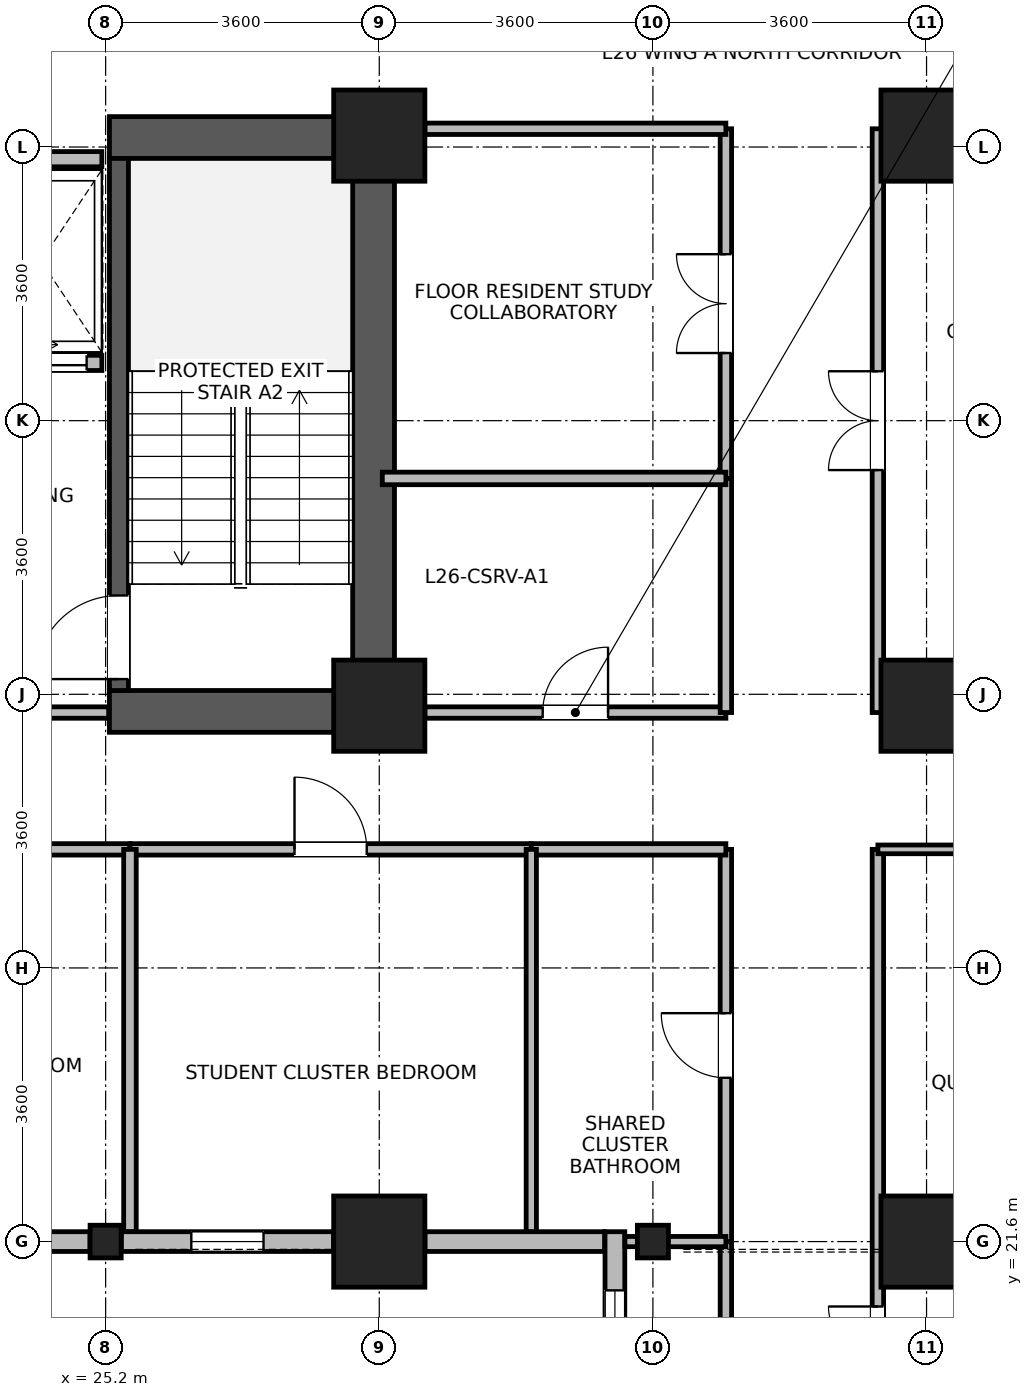
"""IFC4 building model, lengths in metres.
Left out: names, types, materials, properties, quantities, classifications, styles, units other than length and angle.
Written with IfcOpenShell. Run it as: python <this file> out.ifc"""

import sys

from ifc_helpers import new_model, si_unit, direction, frame, frame_2d, origin, origin_2d, place, context, subcontext, project, spatial, rectangle, i_section, extrude, source, transform, mapped, element, fill, save


model = new_model("IFC4")
c1 = context("Model", 3, precision=1e-05, world=origin(), true_north=direction((0.0, 1.0)))
c2 = subcontext(c1, "Body", "Model", "MODEL_VIEW")
j1 = project(units=[si_unit("LENGTHUNIT", "METRE"), si_unit("PLANEANGLEUNIT", "RADIAN")], contexts=[c1])
p1 = place(None, origin())
s1 = spatial("IfcSite", under=j1, at=p1, CompositionType="ELEMENT")
p2 = place(p1, origin())
s2 = spatial("IfcBuilding", under=s1, at=p2, CompositionType="ELEMENT")
p3 = place(p2, frame((0.0, 0.0, 104.5)))
s3 = spatial("IfcBuildingStorey", under=s2, at=p3, CompositionType="ELEMENT", Elevation=104.5)
p4 = place(p3, frame((28.725, 28.3, 0.0), z_axis=(0.0, 0.0, 1.0), x_axis=(0.0, 1.0, 0.0)))
e1 = element("IfcWall", 1, at=p4, inside=s3, PredefinedType="SHEAR", context=c2, shape_type="SweptSolid", body=[
    extrude(rectangle(XDim=8.1, YDim=0.55, at=frame_2d((4.05, 0.0))), origin(), (0.0, 0.0, 1.0), 3.45),
])
for number, where, z_axis, x_axis in (
    (2, (25.25, 28.575, 0.0), (0.0, 0.0, 1.0), (1.0, 0.0, 0.0)),
    (3, (25.25, 36.125, 0.0), (0.0, 0.0, 1.0), (1.0, 0.0, 0.0)),
):
    element("IfcWall", number, at=place(p3, frame(where, z_axis=z_axis, x_axis=x_axis)), inside=s3, PredefinedType="SHEAR", context=c2, shape_type="SweptSolid", body=[
        extrude(rectangle(XDim=3.2, YDim=0.55, at=frame_2d((1.6, 0.0))), origin(), (0.0, 0.0, 1.0), 3.45),
    ])
p5 = place(p3, frame((25.375, 28.85, 0.0), z_axis=(0.0, 0.0, 1.0), x_axis=(0.0, 1.0, 0.0)))
e4 = element("IfcWall", 4, at=p5, inside=s3, PredefinedType="SHEAR", context=c2, shape_type="SweptSolid", body=[
    extrude(rectangle(XDim=7.0, YDim=0.25, at=frame_2d((3.5, 0.0))), origin(), (0.0, 0.0, 1.0), 3.45),
])
p6 = place(p5, frame((0.15, 0.0, 0.0)))
e5 = element("IfcOpeningElement", 5, at=p6, cuts=e4, PredefinedType="OPENING", context=c2, shape_type="SweptSolid", body=[
    extrude(rectangle(XDim=1.1, YDim=2.08, at=frame_2d((0.55, 1.04))), frame((0.0, 0.135, 0.0), z_axis=(0.0, -1.0, 0.0), x_axis=(1.0, 0.0, 0.0)), (0.0, 0.0, 1.0), 0.27),
])
m1 = source(origin(), c2, "Body", "SweptSolid", [
    extrude(rectangle(XDim=1.2, YDim=1.2, at=origin_2d()), origin(), (0.0, 0.0, 1.0), 3.7),
])
for number, where, z_axis, x_axis in (
    (6, (28.8, 21.6, 0.0), (0.0, 0.0, 1.0), (1.0, 0.0, 0.0)),
    (7, (28.8, 28.65, 0.0), (0.0, 0.0, 1.0), (1.0, 0.0, 0.0)),
    (8, (28.8, 36.15, 0.0), (0.0, 0.0, 1.0), (1.0, 0.0, 0.0)),
    (9, (36.0, 21.6, 0.0), (0.0, 0.0, 1.0), (1.0, 0.0, 0.0)),
    (10, (36.0, 28.65, 0.0), (0.0, 0.0, 1.0), (1.0, 0.0, 0.0)),
    (11, (36.0, 36.15, 0.0), (0.0, 0.0, 1.0), (1.0, 0.0, 0.0)),
):
    element("IfcColumn", number, at=place(p3, frame(where, z_axis=z_axis, x_axis=x_axis)), inside=s3, PredefinedType="COLUMN", context=c2, shape_type="MappedRepresentation", body=[
        mapped(m1, transform((0.0, 0.0, 0.0), x_axis=(1.0, 0.0, 0.0), y_axis=(0.0, 1.0, 0.0), z_axis=(0.0, 0.0, 1.0), scale=1.0)),
    ])
m2 = source(origin(), c2, "Body", "SweptSolid", [
    extrude(i_section(OverallWidth=0.409, OverallDepth=0.43, WebThickness=0.024, FlangeThickness=0.033, FilletRadius=0.015, at=origin_2d()), origin(), (0.0, 0.0, 1.0), 3.7),
])
for number, where, z_axis, x_axis in (
    (12, (25.2, 21.6, 0.0), (0.0, 0.0, 1.0), (1.0, 0.0, 0.0)),
    (13, (32.4, 21.6, 0.0), (0.0, 0.0, 1.0), (1.0, 0.0, 0.0)),
):
    element("IfcColumn", number, at=place(p3, frame(where, z_axis=z_axis, x_axis=x_axis)), inside=s3, PredefinedType="COLUMN", context=c2, shape_type="MappedRepresentation", body=[
        mapped(m2, transform((0.0, 0.0, 0.0), x_axis=(1.0, 0.0, 0.0), y_axis=(0.0, 1.0, 0.0), z_axis=(0.0, 0.0, 1.0), scale=1.0)),
    ])
p7 = place(p3, frame((24.994, 21.6, 0.0), z_axis=(0.0, 0.0, 1.0), x_axis=(-1.0, 0.0, 0.0)))
e14 = element("IfcWall", 14, at=p7, inside=s3, PredefinedType="STANDARD", context=c2, shape_type="SweptSolid", body=[
    extrude(rectangle(XDim=2.793, YDim=0.26, at=frame_2d((1.397, 0.0))), origin(), (0.0, 0.0, 1.0), 2.98),
])
p8 = place(p7, frame((0.922, 0.0, 0.85)))
e15 = element("IfcOpeningElement", 15, at=p8, cuts=e14, PredefinedType="OPENING", context=c2, shape_type="SweptSolid", body=[
    extrude(rectangle(XDim=0.95, YDim=1.75, at=frame_2d((0.475, 0.875))), frame((0.0, 0.14, 0.0), z_axis=(0.0, -1.0, 0.0), x_axis=(1.0, 0.0, 0.0)), (0.0, 0.0, 1.0), 0.28),
])
p9 = place(p3, frame((28.199, 21.6, 0.0), z_axis=(0.0, 0.0, 1.0), x_axis=(-1.0, 0.0, 0.0)))
e16 = element("IfcWall", 16, at=p9, inside=s3, PredefinedType="STANDARD", context=c2, shape_type="SweptSolid", body=[
    extrude(rectangle(XDim=2.793, YDim=0.26, at=frame_2d((1.397, 0.0))), origin(), (0.0, 0.0, 1.0), 2.98),
])
p10 = place(p9, frame((0.922, 0.0, 0.85)))
e17 = element("IfcOpeningElement", 17, at=p10, cuts=e16, PredefinedType="OPENING", context=c2, shape_type="SweptSolid", body=[
    extrude(rectangle(XDim=0.95, YDim=1.75, at=frame_2d((0.475, 0.875))), frame((0.0, 0.14, 0.0), z_axis=(0.0, -1.0, 0.0), x_axis=(1.0, 0.0, 0.0)), (0.0, 0.0, 1.0), 0.28),
])
p11 = place(p3, frame((31.765, 21.6, 0.0), z_axis=(0.0, 0.0, 1.0), x_axis=(-1.0, 0.0, 0.0)))
e18 = element("IfcWall", 18, at=p11, inside=s3, PredefinedType="STANDARD", context=c2, shape_type="SweptSolid", body=[
    extrude(rectangle(XDim=2.364, YDim=0.26, at=frame_2d((1.182, 0.0))), origin(), (0.0, 0.0, 1.0), 2.98),
])
p12 = place(p3, frame((31.9, 1.67, 0.0), z_axis=(0.0, 0.0, 1.0), x_axis=(0.0, 1.0, 0.0)))
e19 = element("IfcWall", 19, at=p12, inside=s3, PredefinedType="STANDARD", context=c2, shape_type="SweptSolid", body=[
    extrude(rectangle(XDim=20.06, YDim=0.26, at=frame_2d((10.03, 0.0))), origin(), (0.0, 0.0, 1.0), 3.43),
])
p13 = place(p12, frame((0.772, 0.0, 0.85)))
e20 = element("IfcOpeningElement", 20, at=p13, cuts=e19, PredefinedType="OPENING", context=c2, shape_type="SweptSolid", body=[
    extrude(rectangle(XDim=1.8, YDim=1.85, at=frame_2d((0.9, 0.925))), frame((0.0, 0.14, 0.0), z_axis=(0.0, -1.0, 0.0), x_axis=(1.0, 0.0, 0.0)), (0.0, 0.0, 1.0), 0.28),
])
p14 = place(p12, frame((7.458, 0.0, 0.85)))
e21 = element("IfcOpeningElement", 21, at=p14, cuts=e19, PredefinedType="OPENING", context=c2, shape_type="SweptSolid", body=[
    extrude(rectangle(XDim=1.8, YDim=1.85, at=frame_2d((0.9, 0.925))), frame((0.0, 0.14, 0.0), z_axis=(0.0, -1.0, 0.0), x_axis=(1.0, 0.0, 0.0)), (0.0, 0.0, 1.0), 0.28),
])
p15 = place(p12, frame((14.145, 0.0, 0.85)))
e22 = element("IfcOpeningElement", 22, at=p15, cuts=e19, PredefinedType="OPENING", context=c2, shape_type="SweptSolid", body=[
    extrude(rectangle(XDim=1.8, YDim=1.85, at=frame_2d((0.9, 0.925))), frame((0.0, 0.14, 0.0), z_axis=(0.0, -1.0, 0.0), x_axis=(1.0, 0.0, 0.0)), (0.0, 0.0, 1.0), 0.28),
])
p16 = place(p12, frame((17.488, 0.0, 0.85)))
e23 = element("IfcOpeningElement", 23, at=p16, cuts=e19, PredefinedType="OPENING", context=c2, shape_type="SweptSolid", body=[
    extrude(rectangle(XDim=1.8, YDim=1.85, at=frame_2d((0.9, 0.925))), frame((0.0, 0.14, 0.0), z_axis=(0.0, -1.0, 0.0), x_axis=(1.0, 0.0, 0.0)), (0.0, 0.0, 1.0), 0.28),
])
p17 = place(p3, frame((23.55, 33.16, 0.0), z_axis=(0.0, 0.0, 1.0), x_axis=(1.0, 0.0, 0.0)))
e24 = element("IfcWall", 24, at=p17, inside=s3, PredefinedType="PARTITIONING", context=c2, shape_type="SweptSolid", body=[
    extrude(rectangle(XDim=1.6, YDim=0.2, at=frame_2d((0.8, 0.0))), origin(), (0.0, 0.0, 1.0), 3.43),
])
p18 = place(p17, frame((0.2, 0.0, 0.0)))
e25 = element("IfcOpeningElement", 25, at=p18, cuts=e24, PredefinedType="OPENING", context=c2, shape_type="SweptSolid", body=[
    extrude(rectangle(XDim=1.2, YDim=2.12, at=frame_2d((0.6, 1.06))), frame((0.0, 0.11, 0.0), z_axis=(0.0, -1.0, 0.0), x_axis=(1.0, 0.0, 0.0)), (0.0, 0.0, 1.0), 0.22),
])
p19 = place(p3, frame((23.55, 35.84, 0.0), z_axis=(0.0, 0.0, 1.0), x_axis=(1.0, 0.0, 0.0)))
e26 = element("IfcWall", 26, at=p19, inside=s3, PredefinedType="PARTITIONING", context=c2, shape_type="SweptSolid", body=[
    extrude(rectangle(XDim=1.6, YDim=0.2, at=frame_2d((0.8, 0.0))), origin(), (0.0, 0.0, 1.0), 2.43),
])
p20 = place(p3, frame((35.36, 16.96, 0.0), z_axis=(0.0, 0.0, 1.0), x_axis=(0.0, 1.0, 0.0)))
e27 = element("IfcWall", 27, at=p20, inside=s3, PredefinedType="PARTITIONING", context=c2, shape_type="SweptSolid", body=[
    extrude(rectangle(XDim=9.8, YDim=0.15, at=frame_2d((4.9, 0.0))), origin(), (0.0, 0.0, 1.0), 3.43),
])
p21 = place(p20, frame((2.486, 0.0, 0.0)))
e28 = element("IfcOpeningElement", 28, at=p21, cuts=e27, PredefinedType="OPENING", context=c2, shape_type="SweptSolid", body=[
    extrude(rectangle(XDim=1.3, YDim=2.12, at=frame_2d((0.65, 1.06))), frame((0.0, 0.085, 0.0), z_axis=(0.0, -1.0, 0.0), x_axis=(1.0, 0.0, 0.0)), (0.0, 0.0, 1.0), 0.17),
])
p22 = place(p3, frame((35.36, 28.56, 0.0), z_axis=(0.0, 0.0, 1.0), x_axis=(0.0, 1.0, 0.0)))
e29 = element("IfcWall", 29, at=p22, inside=s3, PredefinedType="PARTITIONING", context=c2, shape_type="SweptSolid", body=[
    extrude(rectangle(XDim=7.68, YDim=0.15, at=frame_2d((3.84, 0.0))), origin(), (0.0, 0.0, 1.0), 3.43),
])
p23 = place(p22, frame((3.19, 0.0, 0.0)))
e30 = element("IfcOpeningElement", 30, at=p23, cuts=e29, PredefinedType="OPENING", context=c2, shape_type="SweptSolid", body=[
    extrude(rectangle(XDim=1.3, YDim=2.12, at=frame_2d((0.65, 1.06))), frame((0.0, 0.085, 0.0), z_axis=(0.0, -1.0, 0.0), x_axis=(1.0, 0.0, 0.0)), (0.0, 0.0, 1.0), 0.17),
])
p24 = place(p3, frame((33.36, 14.5, 0.0), z_axis=(0.0, 0.0, 1.0), x_axis=(0.0, 1.0, 0.0)))
e31 = element("IfcWall", 31, at=p24, inside=s3, PredefinedType="PARTITIONING", context=c2, shape_type="SweptSolid", body=[
    extrude(rectangle(XDim=7.1, YDim=0.15, at=frame_2d((3.55, 0.0))), origin(), (0.0, 0.0, 1.0), 3.43),
])
p25 = place(p24, frame((2.9, 0.0, 0.0)))
e32 = element("IfcOpeningElement", 32, at=p25, cuts=e31, PredefinedType="OPENING", context=c2, shape_type="SweptSolid", body=[
    extrude(rectangle(XDim=1.3, YDim=2.12, at=frame_2d((0.65, 1.06))), frame((0.0, 0.085, 0.0), z_axis=(0.0, -1.0, 0.0), x_axis=(1.0, 0.0, 0.0)), (0.0, 0.0, 1.0), 0.17),
])
p26 = place(p3, frame((19.8, 26.76, 0.0), z_axis=(0.0, 0.0, 1.0), x_axis=(1.0, 0.0, 0.0)))
e33 = element("IfcWall", 33, at=p26, inside=s3, PredefinedType="PARTITIONING", context=c2, shape_type="SweptSolid", body=[
    extrude(rectangle(XDim=5.72, YDim=0.15, at=frame_2d((2.86, 0.0))), origin(), (0.0, 0.0, 1.0), 3.43),
])
p27 = place(p26, frame((2.21, 0.0, 0.0)))
e34 = element("IfcOpeningElement", 34, at=p27, cuts=e33, PredefinedType="OPENING", context=c2, shape_type="SweptSolid", body=[
    extrude(rectangle(XDim=1.3, YDim=2.12, at=frame_2d((0.65, 1.06))), frame((0.0, 0.085, 0.0), z_axis=(0.0, -1.0, 0.0), x_axis=(1.0, 0.0, 0.0)), (0.0, 0.0, 1.0), 0.17),
])
p28 = place(p3, frame((25.52, 26.76, 0.0), z_axis=(0.0, 0.0, 1.0), x_axis=(1.0, 0.0, 0.0)))
e35 = element("IfcWall", 35, at=p28, inside=s3, PredefinedType="PARTITIONING", context=c2, shape_type="SweptSolid", body=[
    extrude(rectangle(XDim=5.28, YDim=0.15, at=frame_2d((2.64, 0.0))), origin(), (0.0, 0.0, 1.0), 3.43),
])
p29 = place(p28, frame((2.165, 0.0, 0.0)))
e36 = element("IfcOpeningElement", 36, at=p29, cuts=e35, PredefinedType="OPENING", context=c2, shape_type="SweptSolid", body=[
    extrude(rectangle(XDim=0.95, YDim=2.1, at=frame_2d((0.475, 1.05))), frame((0.0, 0.085, 0.0), z_axis=(0.0, -1.0, 0.0), x_axis=(1.0, 0.0, 0.0)), (0.0, 0.0, 1.0), 0.17),
])
p30 = place(p3, frame((33.36, 21.6, 0.0), z_axis=(0.0, 0.0, 1.0), x_axis=(0.0, 1.0, 0.0)))
e37 = element("IfcWall", 37, at=p30, inside=s3, PredefinedType="PARTITIONING", context=c2, shape_type="SweptSolid", body=[
    extrude(rectangle(XDim=5.16, YDim=0.15, at=frame_2d((2.58, 0.0))), origin(), (0.0, 0.0, 1.0), 3.43),
])
p31 = place(p30, frame((2.155, 0.0, 0.0)))
e38 = element("IfcOpeningElement", 38, at=p31, cuts=e37, PredefinedType="OPENING", context=c2, shape_type="SweptSolid", body=[
    extrude(rectangle(XDim=0.85, YDim=2.04, at=frame_2d((0.425, 1.02))), frame((0.0, 0.085, 0.0), z_axis=(0.0, -1.0, 0.0), x_axis=(1.0, 0.0, 0.0)), (0.0, 0.0, 1.0), 0.17),
])
p32 = place(p3, frame((33.36, 31.64, 0.0), z_axis=(0.0, 0.0, 1.0), x_axis=(0.0, 1.0, 0.0)))
e39 = element("IfcWall", 39, at=p32, inside=s3, PredefinedType="PARTITIONING", context=c2, shape_type="SweptSolid", body=[
    extrude(rectangle(XDim=4.6, YDim=0.15, at=frame_2d((2.3, 0.0))), origin(), (0.0, 0.0, 1.0), 3.43),
])
p33 = place(p32, frame((1.65, 0.0, 0.0)))
e40 = element("IfcOpeningElement", 40, at=p33, cuts=e39, PredefinedType="OPENING", context=c2, shape_type="SweptSolid", body=[
    extrude(rectangle(XDim=1.3, YDim=2.12, at=frame_2d((0.65, 1.06))), frame((0.0, 0.085, 0.0), z_axis=(0.0, -1.0, 0.0), x_axis=(1.0, 0.0, 0.0)), (0.0, 0.0, 1.0), 0.17),
])
p34 = place(p3, frame((29.4, 28.56, 0.0), z_axis=(0.0, 0.0, 1.0), x_axis=(1.0, 0.0, 0.0)))
e41 = element("IfcWall", 41, at=p34, inside=s3, PredefinedType="PARTITIONING", context=c2, shape_type="SweptSolid", body=[
    extrude(rectangle(XDim=3.96, YDim=0.15, at=frame_2d((1.98, 0.0))), origin(), (0.0, 0.0, 1.0), 2.78),
])
p35 = place(p34, frame((1.55, 0.0, 0.0)))
e42 = element("IfcOpeningElement", 42, at=p35, cuts=e41, PredefinedType="OPENING", context=c2, shape_type="SweptSolid", body=[
    extrude(rectangle(XDim=0.86, YDim=2.02, at=frame_2d((0.43, 1.01))), frame((0.0, 0.085, 0.0), z_axis=(0.0, -1.0, 0.0), x_axis=(1.0, 0.0, 0.0)), (0.0, 0.0, 1.0), 0.17),
])
p36 = place(p3, frame((29.4, 36.24, 0.0), z_axis=(0.0, 0.0, 1.0), x_axis=(1.0, 0.0, 0.0)))
e43 = element("IfcWall", 43, at=p36, inside=s3, PredefinedType="PARTITIONING", context=c2, shape_type="SweptSolid", body=[
    extrude(rectangle(XDim=3.96, YDim=0.15, at=frame_2d((1.98, 0.0))), origin(), (0.0, 0.0, 1.0), 2.78),
])
p37 = place(p3, frame((33.36, 28.56, 0.0), z_axis=(0.0, 0.0, 1.0), x_axis=(0.0, 1.0, 0.0)))
e44 = element("IfcWall", 44, at=p37, inside=s3, PredefinedType="PARTITIONING", context=c2, shape_type="SweptSolid", body=[
    extrude(rectangle(XDim=3.08, YDim=0.15, at=frame_2d((1.54, 0.0))), origin(), (0.0, 0.0, 1.0), 3.43),
])
p38 = place(p3, frame((30.8, 26.76, 0.0), z_axis=(0.0, 0.0, 1.0), x_axis=(1.0, 0.0, 0.0)))
e45 = element("IfcWall", 45, at=p38, inside=s3, PredefinedType="PARTITIONING", context=c2, shape_type="SweptSolid", body=[
    extrude(rectangle(XDim=2.56, YDim=0.15, at=frame_2d((1.28, 0.0))), origin(), (0.0, 0.0, 1.0), 3.43),
])
p39 = place(p3, frame((35.36, 26.76, 0.0), z_axis=(0.0, 0.0, 1.0), x_axis=(1.0, 0.0, 0.0)))
e46 = element("IfcWall", 46, at=p39, inside=s3, PredefinedType="PARTITIONING", context=c2, shape_type="SweptSolid", body=[
    extrude(rectangle(XDim=5.86, YDim=0.115, at=frame_2d((2.93, 0.0))), origin(), (0.0, 0.0, 1.0), 3.43),
])
p40 = place(p3, frame((25.52, 21.732, 0.0), z_axis=(0.0, 0.0, 1.0), x_axis=(0.0, 1.0, 0.0)))
e47 = element("IfcWall", 47, at=p40, inside=s3, PredefinedType="PARTITIONING", context=c2, shape_type="SweptSolid", body=[
    extrude(rectangle(XDim=5.028, YDim=0.165, at=frame_2d((2.514, 0.0))), origin(), (0.0, 0.0, 1.0), 3.43),
])
p41 = place(p3, frame((30.8, 21.732, 0.0), z_axis=(0.0, 0.0, 1.0), x_axis=(0.0, 1.0, 0.0)))
e48 = element("IfcWall", 48, at=p41, inside=s3, PredefinedType="PARTITIONING", context=c2, shape_type="SweptSolid", body=[
    extrude(rectangle(XDim=5.028, YDim=0.135, at=frame_2d((2.514, 0.0))), origin(), (0.0, 0.0, 1.0), 3.43),
])
p42 = place(p3, frame((28.84, 31.64, 0.0), z_axis=(0.0, 0.0, 1.0), x_axis=(1.0, 0.0, 0.0)))
e49 = element("IfcWall", 49, at=p42, inside=s3, PredefinedType="PARTITIONING", context=c2, shape_type="SweptSolid", body=[
    extrude(rectangle(XDim=4.52, YDim=0.165, at=frame_2d((2.26, 0.0))), origin(), (0.0, 0.0, 1.0), 3.43),
])
p43 = place(p3, frame((21.76, 28.56, 0.0), z_axis=(0.0, 0.0, 1.0), x_axis=(1.0, 0.0, 0.0)))
e50 = element("IfcWall", 50, at=p43, inside=s3, PredefinedType="PARTITIONING", context=c2, shape_type="SweptSolid", body=[
    extrude(rectangle(XDim=3.48, YDim=0.15, at=frame_2d((1.74, 0.0))), origin(), (0.0, 0.0, 1.0), 2.43),
])
p44 = place(p43, frame((0.99, 0.0, 0.0)))
e51 = element("IfcOpeningElement", 51, at=p44, cuts=e50, PredefinedType="OPENING", context=c2, shape_type="SweptSolid", body=[
    extrude(rectangle(XDim=1.5, YDim=2.1, at=frame_2d((0.75, 1.05))), frame((0.0, 0.085, 0.0), z_axis=(0.0, -1.0, 0.0), x_axis=(1.0, 0.0, 0.0)), (0.0, 0.0, 1.0), 0.17),
])
p45 = place(p3, frame((32.032, 21.6, 0.0), z_axis=(0.0, 0.0, 1.0), x_axis=(1.0, 0.0, 0.0)))
e52 = element("IfcWall", 52, at=p45, inside=s3, PredefinedType="PARTITIONING", context=c2, shape_type="SweptSolid", body=[
    extrude(rectangle(XDim=1.328, YDim=0.135, at=frame_2d((0.664, 0.0))), origin(), (0.0, 0.0, 1.0), 2.98),
])
p46 = place(p10, origin())
e53 = element("IfcWindow", 53, at=p46, inside=s3, PartitioningType="SINGLE_PANEL", PredefinedType="WINDOW", context=c2, shape_type="SweptSolid", body=[
    extrude(rectangle(XDim=0.95, YDim=1.75, at=frame_2d((0.475, 0.875))), frame((0.0, 0.03, 0.0), z_axis=(0.0, -1.0, 0.0), x_axis=(1.0, 0.0, 0.0)), (0.0, 0.0, 1.0), 0.06),
])
fill(e17, e53)
p47 = place(p16, origin())
e54 = element("IfcWindow", 54, at=p47, inside=s3, PartitioningType="SINGLE_PANEL", PredefinedType="WINDOW", context=c2, shape_type="SweptSolid", body=[
    extrude(rectangle(XDim=1.8, YDim=1.85, at=frame_2d((0.9, 0.925))), frame((0.0, 0.03, 0.0), z_axis=(0.0, -1.0, 0.0), x_axis=(1.0, 0.0, 0.0)), (0.0, 0.0, 1.0), 0.06),
])
fill(e23, e54)
p48 = place(p6, origin())
e55 = element("IfcDoor", 55, at=p48, inside=s3, OperationType="SINGLE_SWING_LEFT", PredefinedType="DOOR", context=c2, shape_type="SweptSolid", body=[
    extrude(rectangle(XDim=1.1, YDim=2.08, at=frame_2d((0.55, 1.04))), frame((0.0, 0.025, 0.0), z_axis=(0.0, -1.0, 0.0), x_axis=(1.0, 0.0, 0.0)), (0.0, 0.0, 1.0), 0.05),
])
fill(e5, e55)
p49 = place(p18, origin())
e56 = element("IfcDoor", 56, at=p49, inside=s3, OperationType="SLIDING_TO_RIGHT", PredefinedType="DOOR", context=c2, shape_type="SweptSolid", body=[
    extrude(rectangle(XDim=1.2, YDim=2.12, at=frame_2d((0.6, 1.06))), frame((0.0, 0.025, 0.0), z_axis=(0.0, -1.0, 0.0), x_axis=(1.0, 0.0, 0.0)), (0.0, 0.0, 1.0), 0.05),
])
fill(e25, e56)
p50 = place(p21, origin())
e57 = element("IfcDoor", 57, at=p50, inside=s3, OperationType="DOUBLE_DOOR_SINGLE_SWING", PredefinedType="DOOR", context=c2, shape_type="SweptSolid", body=[
    extrude(rectangle(XDim=1.3, YDim=2.12, at=frame_2d((0.65, 1.06))), frame((0.0, 0.025, 0.0), z_axis=(0.0, -1.0, 0.0), x_axis=(1.0, 0.0, 0.0)), (0.0, 0.0, 1.0), 0.05),
])
fill(e28, e57)
p51 = place(p23, origin())
e58 = element("IfcDoor", 58, at=p51, inside=s3, OperationType="DOUBLE_DOOR_SINGLE_SWING", PredefinedType="DOOR", context=c2, shape_type="SweptSolid", body=[
    extrude(rectangle(XDim=1.3, YDim=2.12, at=frame_2d((0.65, 1.06))), frame((0.0, 0.025, 0.0), z_axis=(0.0, -1.0, 0.0), x_axis=(1.0, 0.0, 0.0)), (0.0, 0.0, 1.0), 0.05),
])
fill(e30, e58)
p52 = place(p29, origin())
e59 = element("IfcDoor", 59, at=p52, inside=s3, OperationType="SINGLE_SWING_LEFT", PredefinedType="DOOR", context=c2, shape_type="SweptSolid", body=[
    extrude(rectangle(XDim=0.95, YDim=2.1, at=frame_2d((0.475, 1.05))), frame((0.0, 0.025, 0.0), z_axis=(0.0, -1.0, 0.0), x_axis=(1.0, 0.0, 0.0)), (0.0, 0.0, 1.0), 0.05),
])
fill(e36, e59)
p53 = place(p31, origin())
e60 = element("IfcDoor", 60, at=p53, inside=s3, OperationType="SINGLE_SWING_RIGHT", PredefinedType="DOOR", context=c2, shape_type="SweptSolid", body=[
    extrude(rectangle(XDim=0.85, YDim=2.04, at=frame_2d((0.425, 1.02))), frame((0.0, 0.025, 0.0), z_axis=(0.0, -1.0, 0.0), x_axis=(1.0, 0.0, 0.0)), (0.0, 0.0, 1.0), 0.05),
])
fill(e38, e60)
p54 = place(p33, origin())
e61 = element("IfcDoor", 61, at=p54, inside=s3, OperationType="DOUBLE_DOOR_SINGLE_SWING", PredefinedType="DOOR", context=c2, shape_type="SweptSolid", body=[
    extrude(rectangle(XDim=1.3, YDim=2.12, at=frame_2d((0.65, 1.06))), frame((0.0, 0.025, 0.0), z_axis=(0.0, -1.0, 0.0), x_axis=(1.0, 0.0, 0.0)), (0.0, 0.0, 1.0), 0.05),
])
fill(e40, e61)
p55 = place(p35, origin())
e62 = element("IfcDoor", 62, at=p55, inside=s3, OperationType="SINGLE_SWING_RIGHT", PredefinedType="DOOR", context=c2, shape_type="SweptSolid", body=[
    extrude(rectangle(XDim=0.86, YDim=2.02, at=frame_2d((0.43, 1.01))), frame((0.0, 0.025, 0.0), z_axis=(0.0, -1.0, 0.0), x_axis=(1.0, 0.0, 0.0)), (0.0, 0.0, 1.0), 0.05),
])
fill(e42, e62)
save(model, sys.argv[1])
